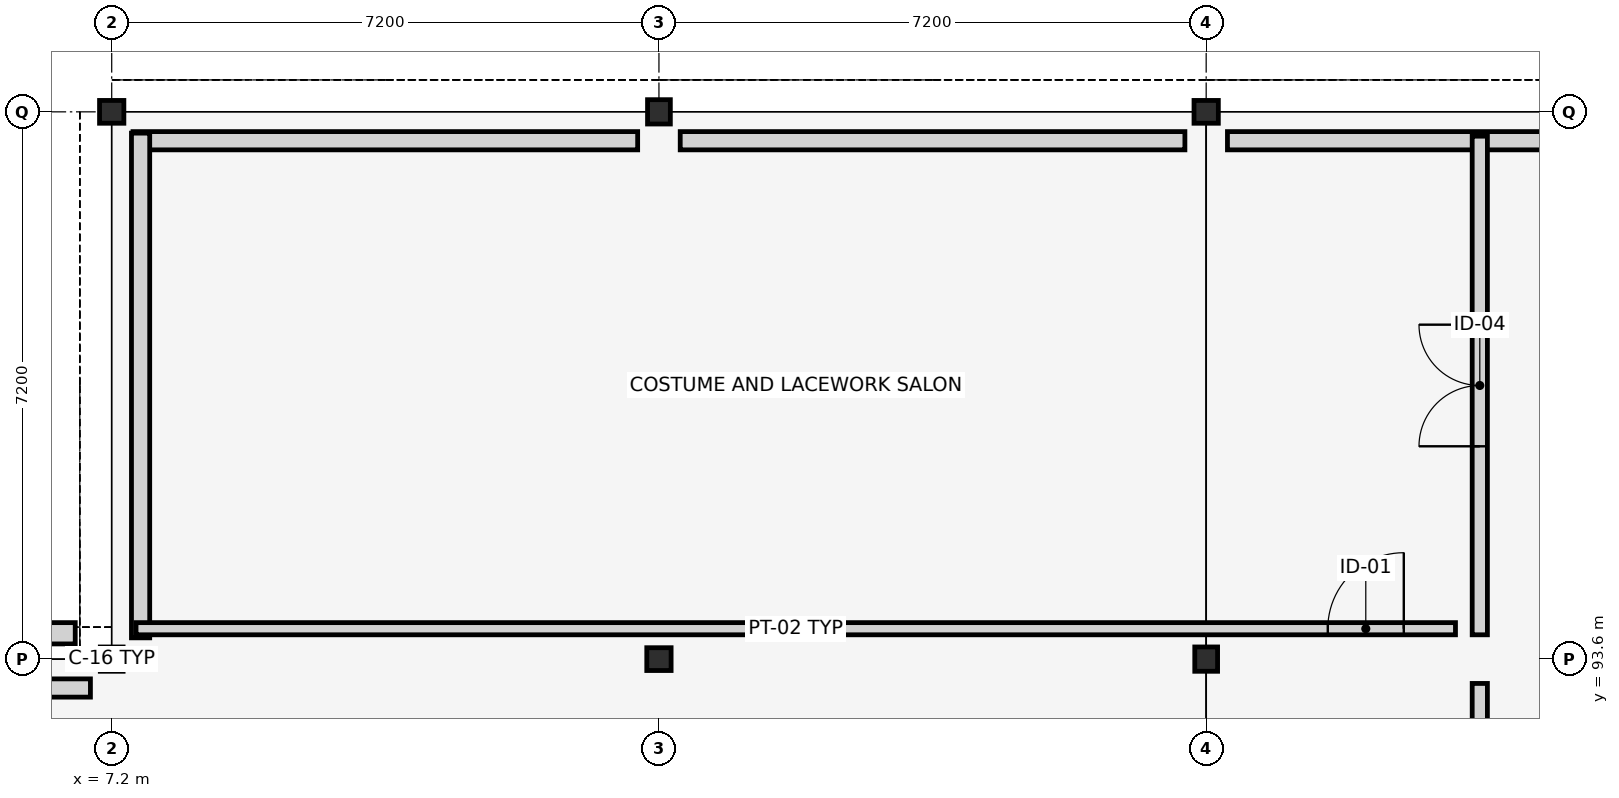
"""IFC4 building model, lengths in metres.
Left out: names, types, materials, properties, quantities, classifications, styles, units other than length and angle.
Written with IfcOpenShell. Run it as: python <this file> out.ifc"""

import sys

from ifc_helpers import new_model, si_unit, direction, frame, frame_2d, origin, origin_2d, place, context, subcontext, project, spatial, rectangle, i_section, extrude, element, fill, save


model = new_model("IFC4")
c1 = context("Model", 3, precision=1e-05, world=origin(), true_north=direction((0.0, 1.0)))
c2 = subcontext(c1, "Body", "Model", "MODEL_VIEW")
j1 = project(units=[si_unit("LENGTHUNIT", "METRE"), si_unit("PLANEANGLEUNIT", "RADIAN")], contexts=[c1])
p1 = place(None, origin())
s1 = spatial("IfcSite", under=j1, at=p1, CompositionType="ELEMENT")
p2 = place(p1, origin())
s2 = spatial("IfcBuilding", under=s1, at=p2, CompositionType="ELEMENT")
p3 = place(p2, frame((0.0, 0.0, 8.7)))
s3 = spatial("IfcBuildingStorey", under=s2, at=p3, CompositionType="ELEMENT", Elevation=8.7)
for number, where, z_axis, x_axis in (
    (1, (7.2, 93.6, 0.0), (0.0, 0.0, 1.0), (1.0, 0.0, 0.0)),
    (2, (7.2, 100.8, 0.0), (0.0, 0.0, 1.0), (0.0, 1.0, 0.0)),
    (3, (14.4, 93.6, 0.0), (0.0, 0.0, 1.0), (0.0, 1.0, 0.0)),
    (4, (14.4, 100.8, 0.0), (0.0, 0.0, 1.0), (1.0, 0.0, 0.0)),
    (5, (21.6, 93.6, 0.0), (0.0, 0.0, 1.0), (1.0, 0.0, 0.0)),
    (6, (21.6, 100.8, 0.0), (0.0, 0.0, 1.0), (0.0, 1.0, 0.0)),
):
    element("IfcColumn", number, at=place(p3, frame(where, z_axis=z_axis, x_axis=x_axis)), inside=s3, PredefinedType="COLUMN", context=c2, shape_type="SweptSolid", body=[
        extrude(i_section(OverallWidth=0.3, OverallDepth=0.32, WebThickness=0.011, FlangeThickness=0.021, FilletRadius=0.027, at=origin_2d()), origin(), (0.0, 0.0, 1.0), 4.2),
    ])
for number, where, z_axis, x_axis in (
    (7, (14.12, 100.42, 0.0), (0.0, 0.0, 1.0), (-1.0, 0.0, 0.0)),
    (8, (21.32, 100.42, 0.0), (0.0, 0.0, 1.0), (-1.0, 0.0, 0.0)),
    (9, (28.52, 100.42, 0.0), (0.0, 0.0, 1.0), (-1.0, 0.0, 0.0)),
    (10, (7.58, 100.52, 0.0), (0.0, 0.0, 1.0), (0.0, -1.0, 0.0)),
):
    element("IfcWall", number, at=place(p3, frame(where, z_axis=z_axis, x_axis=x_axis)), inside=s3, PredefinedType="STANDARD", context=c2, shape_type="SweptSolid", body=[
        extrude(rectangle(XDim=6.64, YDim=0.24, at=frame_2d((3.32, 0.0))), origin(), (0.0, 0.0, 1.0), 3.56),
    ])
p4 = place(p3, frame((6.72, 93.94, 0.0), z_axis=(0.0, 0.0, 1.0), x_axis=(-1.0, 0.0, 0.0)))
e11 = element("IfcWall", 11, at=p4, inside=s3, PredefinedType="STANDARD", context=c2, shape_type="SweptSolid", body=[
    extrude(rectangle(XDim=4.92, YDim=0.28, at=frame_2d((2.46, 0.0))), origin(), (0.0, 0.0, 1.0), 4.2),
])
p5 = place(p3, frame((6.92, 93.22, 0.0), z_axis=(0.0, 0.0, 1.0), x_axis=(-1.0, 0.0, 0.0)))
e12 = element("IfcWall", 12, at=p5, inside=s3, PredefinedType="STANDARD", context=c2, shape_type="SweptSolid", body=[
    extrude(rectangle(XDim=4.84, YDim=0.24, at=frame_2d((2.42, 0.0))), origin(), (0.0, 0.0, 1.0), 3.56),
])
p6 = place(p3, frame((25.2, 72.32, 0.0), z_axis=(0.0, 0.0, 1.0), x_axis=(0.0, 1.0, 0.0)))
e13 = element("IfcWall", 13, at=p6, inside=s3, PredefinedType="PARTITIONING", context=c2, shape_type="SweptSolid", body=[
    extrude(rectangle(XDim=20.96, YDim=0.2, at=frame_2d((10.48, 0.0))), origin(), (0.0, 0.0, 1.0), 3.15),
])
p7 = place(p6, frame((9.73, 0.0, 0.0)))
e14 = element("IfcOpeningElement", 14, at=p7, cuts=e13, PredefinedType="OPENING", context=c2, shape_type="SweptSolid", body=[
    extrude(rectangle(XDim=1.5, YDim=2.25, at=frame_2d((0.75, 1.125))), frame((0.0, 0.11, 0.0), z_axis=(0.0, -1.0, 0.0), x_axis=(1.0, 0.0, 0.0)), (0.0, 0.0, 1.0), 0.22),
])
p8 = place(p3, frame((25.2, 93.92, 0.0), z_axis=(0.0, 0.0, 1.0), x_axis=(0.0, 1.0, 0.0)))
e15 = element("IfcWall", 15, at=p8, inside=s3, PredefinedType="PARTITIONING", context=c2, shape_type="SweptSolid", body=[
    extrude(rectangle(XDim=6.56, YDim=0.2, at=frame_2d((3.28, 0.0))), origin(), (0.0, 0.0, 1.0), 3.15),
])
p9 = place(p8, frame((2.48, 0.0, 0.0)))
e16 = element("IfcOpeningElement", 16, at=p9, cuts=e15, PredefinedType="OPENING", context=c2, shape_type="SweptSolid", body=[
    extrude(rectangle(XDim=1.6, YDim=2.35, at=frame_2d((0.8, 1.175))), frame((0.0, 0.11, 0.0), z_axis=(0.0, -1.0, 0.0), x_axis=(1.0, 0.0, 0.0)), (0.0, 0.0, 1.0), 0.22),
])
p10 = place(p3, frame((7.52, 94.0, 0.0), z_axis=(0.0, 0.0, 1.0), x_axis=(1.0, 0.0, 0.0)))
e17 = element("IfcWall", 17, at=p10, inside=s3, PredefinedType="PARTITIONING", context=c2, shape_type="SweptSolid", body=[
    extrude(rectangle(XDim=17.36, YDim=0.16, at=frame_2d((8.68, 0.0))), origin(), (0.0, 0.0, 1.0), 3.15),
])
p11 = place(p10, frame((15.68, 0.0, 0.0)))
e18 = element("IfcOpeningElement", 18, at=p11, cuts=e17, PredefinedType="OPENING", context=c2, shape_type="SweptSolid", body=[
    extrude(rectangle(XDim=1.0, YDim=2.15, at=frame_2d((0.5, 1.075))), frame((0.0, 0.09, 0.0), z_axis=(0.0, -1.0, 0.0), x_axis=(1.0, 0.0, 0.0)), (0.0, 0.0, 1.0), 0.18),
])
p12 = place(p9, origin())
e19 = element("IfcDoor", 19, at=p12, inside=s3, OperationType="DOUBLE_DOOR_SINGLE_SWING", PredefinedType="DOOR", context=c2, shape_type="SweptSolid", body=[
    extrude(rectangle(XDim=1.6, YDim=2.35, at=frame_2d((0.8, 1.175))), frame((0.0, 0.025, 0.0), z_axis=(0.0, -1.0, 0.0), x_axis=(1.0, 0.0, 0.0)), (0.0, 0.0, 1.0), 0.05),
])
fill(e16, e19)
p13 = place(p11, origin())
e20 = element("IfcDoor", 20, at=p13, inside=s3, OperationType="SINGLE_SWING_RIGHT", PredefinedType="DOOR", context=c2, shape_type="SweptSolid", body=[
    extrude(rectangle(XDim=1.0, YDim=2.15, at=frame_2d((0.5, 1.075))), frame((0.0, 0.025, 0.0), z_axis=(0.0, -1.0, 0.0), x_axis=(1.0, 0.0, 0.0)), (0.0, 0.0, 1.0), 0.05),
])
fill(e18, e20)
save(model, sys.argv[1])
